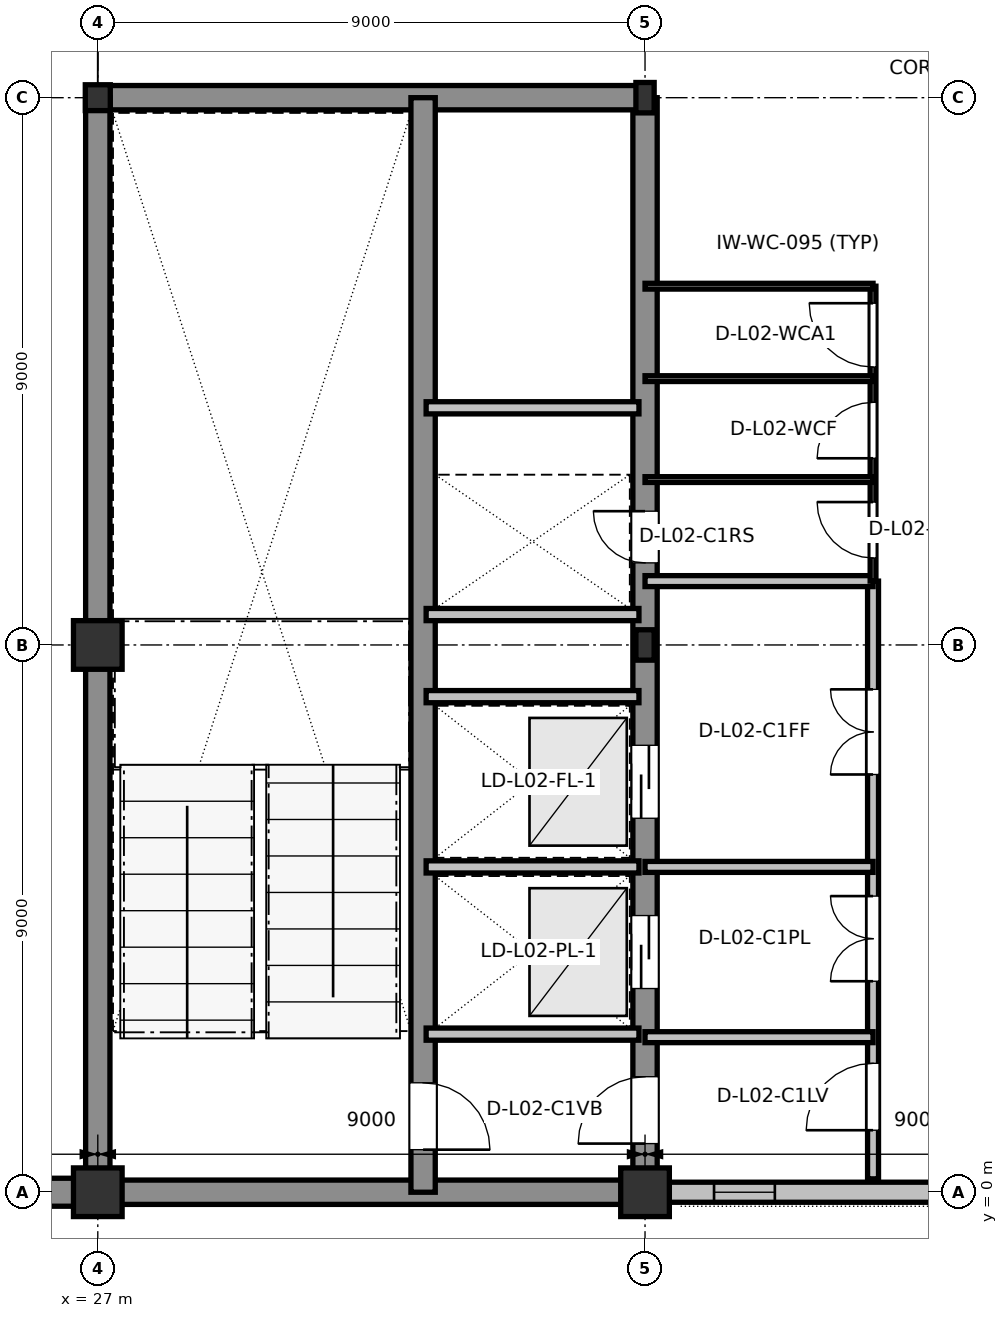
"""IFC4 building model, lengths in metres.
Left out: names, types, materials, properties, quantities, classifications, styles, units other than length and angle.
Written with IfcOpenShell. Run it as: python <this file> out.ifc"""

import sys

from ifc_helpers import new_model, si_unit, direction, frame, frame_2d, origin, origin_2d, place, context, subcontext, project, spatial, rectangle, i_section, extrude, element, fill, save


model = new_model("IFC4")
c1 = context("Model", 3, precision=1e-05, world=origin(), true_north=direction((0.0, 1.0)))
c2 = subcontext(c1, "Body", "Model", "MODEL_VIEW")
j1 = project(units=[si_unit("LENGTHUNIT", "METRE"), si_unit("PLANEANGLEUNIT", "RADIAN")], contexts=[c1])
p1 = place(None, origin())
s1 = spatial("IfcSite", under=j1, at=p1, CompositionType="ELEMENT")
p2 = place(p1, origin())
s2 = spatial("IfcBuilding", under=s1, at=p2, CompositionType="ELEMENT")
p3 = place(p2, frame((0.0, 0.0, 10.2)))
s3 = spatial("IfcBuildingStorey", under=s2, at=p3, CompositionType="ELEMENT", Elevation=10.2)
for number, where, z_axis, x_axis in (
    (1, (27.0, 0.0, 0.0), (0.0, 0.0, 1.0), (1.0, 0.0, 0.0)),
    (2, (27.0, 9.0, 0.0), (0.0, 0.0, 1.0), (1.0, 0.0, 0.0)),
):
    element("IfcColumn", number, at=place(p3, frame(where, z_axis=z_axis, x_axis=x_axis)), inside=s3, PredefinedType="COLUMN", context=c2, shape_type="SweptSolid", body=[
        extrude(rectangle(XDim=0.8, YDim=0.8, at=origin_2d()), origin(), (0.0, 0.0, 1.0), 4.8),
    ])
p4 = place(p3, frame((27.0, 18.0, 0.0), z_axis=(0.0, 0.0, 1.0), x_axis=(1.0, 0.0, 0.0)))
e3 = element("IfcColumn", 3, at=p4, inside=s3, PredefinedType="COLUMN", context=c2, shape_type="SweptSolid", body=[
    extrude(i_section(OverallWidth=0.411, OverallDepth=0.425, WebThickness=0.021, FlangeThickness=0.032, at=origin_2d()), origin(), (0.0, 0.0, 1.0), 4.8),
])
p5 = place(p3, frame((36.0, 0.0, 0.0), z_axis=(0.0, 0.0, 1.0), x_axis=(1.0, 0.0, 0.0)))
e4 = element("IfcColumn", 4, at=p5, inside=s3, PredefinedType="COLUMN", context=c2, shape_type="SweptSolid", body=[
    extrude(rectangle(XDim=0.8, YDim=0.8, at=origin_2d()), origin(), (0.0, 0.0, 1.0), 4.8),
])
for number, where, z_axis, x_axis in (
    (5, (36.0, 9.0, 0.0), (0.0, 0.0, 1.0), (1.0, 0.0, 0.0)),
    (6, (36.0, 18.0, 0.0), (0.0, 0.0, 1.0), (1.0, 0.0, 0.0)),
):
    element("IfcColumn", number, at=place(p3, frame(where, z_axis=z_axis, x_axis=x_axis)), inside=s3, PredefinedType="COLUMN", context=c2, shape_type="SweptSolid", body=[
        extrude(i_section(OverallWidth=0.3, OverallDepth=0.5, WebThickness=0.014, FlangeThickness=0.028, at=origin_2d()), origin(), (0.0, 0.0, 1.0), 4.8),
    ])
p6 = place(p3, frame((36.385, 0.0, 0.0), z_axis=(0.0, 0.0, 1.0), x_axis=(1.0, 0.0, 0.0)))
e7 = element("IfcWall", 7, at=p6, inside=s3, PredefinedType="STANDARD", context=c2, shape_type="SweptSolid", body=[
    extrude(rectangle(XDim=8.23, YDim=0.33, at=frame_2d((4.115, 0.0))), origin(), (0.0, 0.0, 1.0), 4.235),
])
p7 = place(p6, frame((0.75, 0.0, 0.9)))
e8 = element("IfcOpeningElement", 8, at=p7, cuts=e7, PredefinedType="OPENING", context=c2, shape_type="SweptSolid", body=[
    extrude(rectangle(XDim=1.0, YDim=1.35, at=frame_2d((0.5, 0.675))), frame((0.0, 0.175, 0.0), z_axis=(0.0, -1.0, 0.0), x_axis=(1.0, 0.0, 0.0)), (0.0, 0.0, 1.0), 0.35),
])
p8 = place(p3, frame((18.285, 0.0, 0.0), z_axis=(0.0, 0.0, 1.0), x_axis=(1.0, 0.0, 0.0)))
e9 = element("IfcWall", 9, at=p8, inside=s3, PredefinedType="STANDARD", context=c2, shape_type="SweptSolid", body=[
    extrude(rectangle(XDim=8.33, YDim=0.46, at=frame_2d((4.165, 0.0))), origin(), (0.0, 0.0, 1.0), 4.8),
])
p9 = place(p3, frame((27.0, 0.0, 0.0), z_axis=(0.0, 0.0, 1.0), x_axis=(1.0, 0.0, 0.0)))
e10 = element("IfcWall", 10, at=p9, inside=s3, PredefinedType="SHEAR", context=c2, shape_type="SweptSolid", body=[
    extrude(rectangle(XDim=9.0, YDim=0.4, at=frame_2d((4.5, 0.0))), origin(), (0.0, 0.0, 1.0), 4.56),
])
p10 = place(p3, frame((36.0, 0.0, 0.0), z_axis=(0.0, 0.0, 1.0), x_axis=(0.0, 1.0, 0.0)))
e11 = element("IfcWall", 11, at=p10, inside=s3, PredefinedType="SHEAR", context=c2, shape_type="SweptSolid", body=[
    extrude(rectangle(XDim=18.0, YDim=0.4, at=frame_2d((9.0, 0.0))), origin(), (0.0, 0.0, 1.0), 4.56),
])
p11 = place(p10, frame((0.8, 0.0, 0.0)))
e12 = element("IfcOpeningElement", 12, at=p11, cuts=e11, PredefinedType="OPENING", context=c2, shape_type="SweptSolid", body=[
    extrude(rectangle(XDim=1.1, YDim=2.16, at=frame_2d((0.55, 1.08))), frame((0.0, 0.21, 0.0), z_axis=(0.0, -1.0, 0.0), x_axis=(1.0, 0.0, 0.0)), (0.0, 0.0, 1.0), 0.42),
])
p12 = place(p10, frame((3.35, 0.0, 0.0)))
e13 = element("IfcOpeningElement", 13, at=p12, cuts=e11, PredefinedType="OPENING", context=c2, shape_type="SweptSolid", body=[
    extrude(rectangle(XDim=1.2, YDim=2.2, at=frame_2d((0.6, 1.1))), frame((0.0, 0.21, 0.0), z_axis=(0.0, -1.0, 0.0), x_axis=(1.0, 0.0, 0.0)), (0.0, 0.0, 1.0), 0.42),
])
p13 = place(p10, frame((6.15, 0.0, 0.0)))
e14 = element("IfcOpeningElement", 14, at=p13, cuts=e11, PredefinedType="OPENING", context=c2, shape_type="SweptSolid", body=[
    extrude(rectangle(XDim=1.2, YDim=2.2, at=frame_2d((0.6, 1.1))), frame((0.0, 0.21, 0.0), z_axis=(0.0, -1.0, 0.0), x_axis=(1.0, 0.0, 0.0)), (0.0, 0.0, 1.0), 0.42),
])
p14 = place(p10, frame((10.35, 0.0, 0.0)))
e15 = element("IfcOpeningElement", 15, at=p14, cuts=e11, PredefinedType="OPENING", context=c2, shape_type="SweptSolid", body=[
    extrude(rectangle(XDim=0.85, YDim=2.1, at=frame_2d((0.425, 1.05))), frame((0.0, 0.21, 0.0), z_axis=(0.0, -1.0, 0.0), x_axis=(1.0, 0.0, 0.0)), (0.0, 0.0, 1.0), 0.42),
])
p15 = place(p3, frame((36.0, 18.0, 0.0), z_axis=(0.0, 0.0, 1.0), x_axis=(-1.0, 0.0, 0.0)))
e16 = element("IfcWall", 16, at=p15, inside=s3, PredefinedType="SHEAR", context=c2, shape_type="SweptSolid", body=[
    extrude(rectangle(XDim=9.0, YDim=0.4, at=frame_2d((4.5, 0.0))), origin(), (0.0, 0.0, 1.0), 4.56),
])
p16 = place(p3, frame((27.0, 18.0, 0.0), z_axis=(0.0, 0.0, 1.0), x_axis=(0.0, -1.0, 0.0)))
e17 = element("IfcWall", 17, at=p16, inside=s3, PredefinedType="SHEAR", context=c2, shape_type="SweptSolid", body=[
    extrude(rectangle(XDim=18.0, YDim=0.4, at=frame_2d((9.0, 0.0))), origin(), (0.0, 0.0, 1.0), 4.56),
])
p17 = place(p3, frame((32.35, 0.0, 0.0), z_axis=(0.0, 0.0, 1.0), x_axis=(0.0, 1.0, 0.0)))
e18 = element("IfcWall", 18, at=p17, inside=s3, PredefinedType="SHEAR", context=c2, shape_type="SweptSolid", body=[
    extrude(rectangle(XDim=18.0, YDim=0.4, at=frame_2d((9.0, 0.0))), origin(), (0.0, 0.0, 1.0), 4.56),
])
p18 = place(p17, frame((0.7, 0.0, 0.0)))
e19 = element("IfcOpeningElement", 19, at=p18, cuts=e18, PredefinedType="OPENING", context=c2, shape_type="SweptSolid", body=[
    extrude(rectangle(XDim=1.1, YDim=2.16, at=frame_2d((0.55, 1.08))), frame((0.0, 0.21, 0.0), z_axis=(0.0, -1.0, 0.0), x_axis=(1.0, 0.0, 0.0)), (0.0, 0.0, 1.0), 0.42),
])
for number, where, z_axis, x_axis in (
    (20, (32.4, 2.6, 0.0), (0.0, 0.0, 1.0), (1.0, 0.0, 0.0)),
    (21, (32.4, 5.35, 0.0), (0.0, 0.0, 1.0), (1.0, 0.0, 0.0)),
    (22, (32.4, 8.15, 0.0), (0.0, 0.0, 1.0), (1.0, 0.0, 0.0)),
    (23, (32.4, 9.5, 0.0), (0.0, 0.0, 1.0), (1.0, 0.0, 0.0)),
    (24, (32.4, 12.9, 0.0), (0.0, 0.0, 1.0), (1.0, 0.0, 0.0)),
):
    element("IfcWall", number, at=place(p3, frame(where, z_axis=z_axis, x_axis=x_axis)), inside=s3, PredefinedType="PARTITIONING", context=c2, shape_type="SweptSolid", body=[
        extrude(rectangle(XDim=3.5, YDim=0.2, at=frame_2d((1.75, 0.0))), origin(), (0.0, 0.0, 1.0), 4.56),
    ])
p19 = place(p3, frame((39.75, 0.22, 0.0), z_axis=(0.0, 0.0, 1.0), x_axis=(0.0, 1.0, 0.0)))
e25 = element("IfcWall", 25, at=p19, inside=s3, PredefinedType="PARTITIONING", context=c2, shape_type="SweptSolid", body=[
    extrude(rectangle(XDim=9.83, YDim=0.18, at=frame_2d((4.915, 0.0))), origin(), (0.0, 0.0, 1.0), 4.56),
])
p20 = place(p19, frame((0.8, 0.0, 0.0)))
e26 = element("IfcOpeningElement", 26, at=p20, cuts=e25, PredefinedType="OPENING", context=c2, shape_type="SweptSolid", body=[
    extrude(rectangle(XDim=1.1, YDim=2.16, at=frame_2d((0.55, 1.08))), frame((0.0, 0.1, 0.0), z_axis=(0.0, -1.0, 0.0), x_axis=(1.0, 0.0, 0.0)), (0.0, 0.0, 1.0), 0.2),
])
p21 = place(p19, frame((3.25, 0.0, 0.0)))
e27 = element("IfcOpeningElement", 27, at=p21, cuts=e25, PredefinedType="OPENING", context=c2, shape_type="SweptSolid", body=[
    extrude(rectangle(XDim=1.4, YDim=2.2, at=frame_2d((0.7, 1.1))), frame((0.0, 0.1, 0.0), z_axis=(0.0, -1.0, 0.0), x_axis=(1.0, 0.0, 0.0)), (0.0, 0.0, 1.0), 0.2),
])
p22 = place(p19, frame((6.65, 0.0, 0.0)))
e28 = element("IfcOpeningElement", 28, at=p22, cuts=e25, PredefinedType="OPENING", context=c2, shape_type="SweptSolid", body=[
    extrude(rectangle(XDim=1.4, YDim=2.2, at=frame_2d((0.7, 1.1))), frame((0.0, 0.1, 0.0), z_axis=(0.0, -1.0, 0.0), x_axis=(1.0, 0.0, 0.0)), (0.0, 0.0, 1.0), 0.2),
])
for number, where, z_axis, x_axis in (
    (29, (36.0, 2.55, 0.0), (0.0, 0.0, 1.0), (1.0, 0.0, 0.0)),
    (30, (36.0, 5.35, 0.0), (0.0, 0.0, 1.0), (1.0, 0.0, 0.0)),
    (31, (36.0, 10.05, 0.0), (0.0, 0.0, 1.0), (1.0, 0.0, 0.0)),
):
    element("IfcWall", number, at=place(p3, frame(where, z_axis=z_axis, x_axis=x_axis)), inside=s3, PredefinedType="PARTITIONING", context=c2, shape_type="SweptSolid", body=[
        extrude(rectangle(XDim=3.75, YDim=0.18, at=frame_2d((1.875, 0.0))), origin(), (0.0, 0.0, 1.0), 4.56),
    ])
p23 = place(p3, frame((39.75, 10.05, 0.0), z_axis=(0.0, 0.0, 1.0), x_axis=(0.0, 1.0, 0.0)))
e32 = element("IfcWall", 32, at=p23, inside=s3, PredefinedType="PARTITIONING", context=c2, shape_type="SweptSolid", body=[
    extrude(rectangle(XDim=4.85, YDim=0.095, at=frame_2d((2.425, 0.0))), origin(), (0.0, 0.0, 1.0), 4.56),
])
p24 = place(p23, frame((0.38, 0.0, 0.0)))
e33 = element("IfcOpeningElement", 33, at=p24, cuts=e32, PredefinedType="OPENING", context=c2, shape_type="SweptSolid", body=[
    extrude(rectangle(XDim=0.92, YDim=2.1, at=frame_2d((0.46, 1.05))), frame((0.0, 0.057, 0.0), z_axis=(0.0, -1.0, 0.0), x_axis=(1.0, 0.0, 0.0)), (0.0, 0.0, 1.0), 0.115),
])
p25 = place(p23, frame((2.02, 0.0, 0.0)))
e34 = element("IfcOpeningElement", 34, at=p25, cuts=e32, PredefinedType="OPENING", context=c2, shape_type="SweptSolid", body=[
    extrude(rectangle(XDim=0.92, YDim=2.1, at=frame_2d((0.46, 1.05))), frame((0.0, 0.057, 0.0), z_axis=(0.0, -1.0, 0.0), x_axis=(1.0, 0.0, 0.0)), (0.0, 0.0, 1.0), 0.115),
])
p26 = place(p23, frame((3.52, 0.0, 0.0)))
e35 = element("IfcOpeningElement", 35, at=p26, cuts=e32, PredefinedType="OPENING", context=c2, shape_type="SweptSolid", body=[
    extrude(rectangle(XDim=1.05, YDim=2.13, at=frame_2d((0.525, 1.065))), frame((0.0, 0.057, 0.0), z_axis=(0.0, -1.0, 0.0), x_axis=(1.0, 0.0, 0.0)), (0.0, 0.0, 1.0), 0.115),
])
for number, where, z_axis, x_axis in (
    (36, (36.0, 11.72, 0.0), (0.0, 0.0, 1.0), (1.0, 0.0, 0.0)),
    (37, (36.0, 13.38, 0.0), (0.0, 0.0, 1.0), (1.0, 0.0, 0.0)),
):
    element("IfcWall", number, at=place(p3, frame(where, z_axis=z_axis, x_axis=x_axis)), inside=s3, PredefinedType="PARTITIONING", context=c2, shape_type="SweptSolid", body=[
        extrude(rectangle(XDim=3.75, YDim=0.095, at=frame_2d((1.875, 0.0))), origin(), (0.0, 0.0, 1.0), 4.56),
    ])
p27 = place(p3, frame((36.0, 14.9, 0.0), z_axis=(0.0, 0.0, 1.0), x_axis=(1.0, 0.0, 0.0)))
e38 = element("IfcWall", 38, at=p27, inside=s3, PredefinedType="PARTITIONING", context=c2, shape_type="SweptSolid", body=[
    extrude(rectangle(XDim=3.75, YDim=0.095, at=frame_2d((1.875, 0.0))), origin(), (0.0, 0.0, 1.0), 4.215),
])
p28 = place(p7, origin())
e39 = element("IfcWindow", 39, at=p28, inside=s3, PartitioningType="SINGLE_PANEL", PredefinedType="WINDOW", context=c2, shape_type="SweptSolid", body=[
    extrude(rectangle(XDim=1.0, YDim=1.35, at=frame_2d((0.5, 0.675))), frame((0.0, 0.03, 0.0), z_axis=(0.0, -1.0, 0.0), x_axis=(1.0, 0.0, 0.0)), (0.0, 0.0, 1.0), 0.06),
])
fill(e8, e39)
p29 = place(p18, frame((1.1, 0.0, 0.0), z_axis=(0.0, 0.0, 1.0), x_axis=(-1.0, 0.0, 0.0)))
e40 = element("IfcDoor", 40, at=p29, inside=s3, OperationType="SINGLE_SWING_RIGHT", PredefinedType="DOOR", context=c2, shape_type="SweptSolid", body=[
    extrude(rectangle(XDim=1.1, YDim=2.16, at=frame_2d((0.55, 1.08))), frame((0.0, 0.025, 0.0), z_axis=(0.0, -1.0, 0.0), x_axis=(1.0, 0.0, 0.0)), (0.0, 0.0, 1.0), 0.05),
])
fill(e19, e40)
p30 = place(p11, origin())
e41 = element("IfcDoor", 41, at=p30, inside=s3, OperationType="SINGLE_SWING_LEFT", PredefinedType="DOOR", context=c2, shape_type="SweptSolid", body=[
    extrude(rectangle(XDim=1.1, YDim=2.16, at=frame_2d((0.55, 1.08))), frame((0.0, 0.025, 0.0), z_axis=(0.0, -1.0, 0.0), x_axis=(1.0, 0.0, 0.0)), (0.0, 0.0, 1.0), 0.05),
])
fill(e12, e41)
p31 = place(p12, origin())
e42 = element("IfcDoor", 42, at=p31, inside=s3, OperationType="SLIDING_TO_LEFT", PredefinedType="DOOR", context=c2, shape_type="SweptSolid", body=[
    extrude(rectangle(XDim=1.2, YDim=2.2, at=frame_2d((0.6, 1.1))), frame((0.0, 0.025, 0.0), z_axis=(0.0, -1.0, 0.0), x_axis=(1.0, 0.0, 0.0)), (0.0, 0.0, 1.0), 0.05),
])
fill(e13, e42)
p32 = place(p13, origin())
e43 = element("IfcDoor", 43, at=p32, inside=s3, OperationType="SLIDING_TO_LEFT", PredefinedType="DOOR", context=c2, shape_type="SweptSolid", body=[
    extrude(rectangle(XDim=1.2, YDim=2.2, at=frame_2d((0.6, 1.1))), frame((0.0, 0.025, 0.0), z_axis=(0.0, -1.0, 0.0), x_axis=(1.0, 0.0, 0.0)), (0.0, 0.0, 1.0), 0.05),
])
fill(e14, e43)
p33 = place(p14, origin())
e44 = element("IfcDoor", 44, at=p33, inside=s3, OperationType="SINGLE_SWING_RIGHT", PredefinedType="DOOR", context=c2, shape_type="SweptSolid", body=[
    extrude(rectangle(XDim=0.85, YDim=2.1, at=frame_2d((0.425, 1.05))), frame((0.0, 0.025, 0.0), z_axis=(0.0, -1.0, 0.0), x_axis=(1.0, 0.0, 0.0)), (0.0, 0.0, 1.0), 0.05),
])
fill(e15, e44)
p34 = place(p20, origin())
e45 = element("IfcDoor", 45, at=p34, inside=s3, OperationType="SINGLE_SWING_LEFT", PredefinedType="DOOR", context=c2, shape_type="SweptSolid", body=[
    extrude(rectangle(XDim=1.1, YDim=2.16, at=frame_2d((0.55, 1.08))), frame((0.0, 0.025, 0.0), z_axis=(0.0, -1.0, 0.0), x_axis=(1.0, 0.0, 0.0)), (0.0, 0.0, 1.0), 0.05),
])
fill(e26, e45)
p35 = place(p21, origin())
e46 = element("IfcDoor", 46, at=p35, inside=s3, OperationType="DOUBLE_DOOR_SINGLE_SWING", PredefinedType="DOOR", context=c2, shape_type="SweptSolid", body=[
    extrude(rectangle(XDim=1.4, YDim=2.2, at=frame_2d((0.7, 1.1))), frame((0.0, 0.025, 0.0), z_axis=(0.0, -1.0, 0.0), x_axis=(1.0, 0.0, 0.0)), (0.0, 0.0, 1.0), 0.05),
])
fill(e27, e46)
p36 = place(p22, origin())
e47 = element("IfcDoor", 47, at=p36, inside=s3, OperationType="DOUBLE_DOOR_SINGLE_SWING", PredefinedType="DOOR", context=c2, shape_type="SweptSolid", body=[
    extrude(rectangle(XDim=1.4, YDim=2.2, at=frame_2d((0.7, 1.1))), frame((0.0, 0.025, 0.0), z_axis=(0.0, -1.0, 0.0), x_axis=(1.0, 0.0, 0.0)), (0.0, 0.0, 1.0), 0.05),
])
fill(e28, e47)
p37 = place(p24, origin())
e48 = element("IfcDoor", 48, at=p37, inside=s3, OperationType="SINGLE_SWING_RIGHT", PredefinedType="DOOR", context=c2, shape_type="SweptSolid", body=[
    extrude(rectangle(XDim=0.92, YDim=2.1, at=frame_2d((0.46, 1.05))), frame((0.0, 0.025, 0.0), z_axis=(0.0, -1.0, 0.0), x_axis=(1.0, 0.0, 0.0)), (0.0, 0.0, 1.0), 0.05),
])
fill(e33, e48)
p38 = place(p25, origin())
e49 = element("IfcDoor", 49, at=p38, inside=s3, OperationType="SINGLE_SWING_LEFT", PredefinedType="DOOR", context=c2, shape_type="SweptSolid", body=[
    extrude(rectangle(XDim=0.92, YDim=2.1, at=frame_2d((0.46, 1.05))), frame((0.0, 0.025, 0.0), z_axis=(0.0, -1.0, 0.0), x_axis=(1.0, 0.0, 0.0)), (0.0, 0.0, 1.0), 0.05),
])
fill(e34, e49)
p39 = place(p26, origin())
e50 = element("IfcDoor", 50, at=p39, inside=s3, OperationType="SINGLE_SWING_RIGHT", PredefinedType="DOOR", context=c2, shape_type="SweptSolid", body=[
    extrude(rectangle(XDim=1.05, YDim=2.13, at=frame_2d((0.525, 1.065))), frame((0.0, 0.025, 0.0), z_axis=(0.0, -1.0, 0.0), x_axis=(1.0, 0.0, 0.0)), (0.0, 0.0, 1.0), 0.05),
])
fill(e35, e50)
save(model, sys.argv[1])
